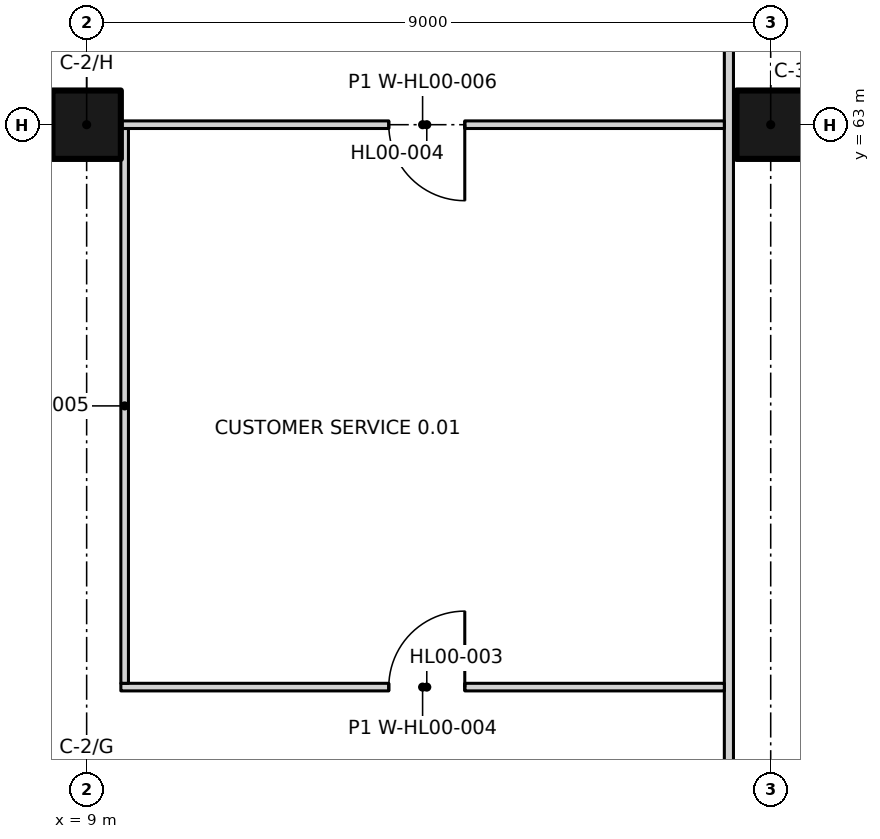
"""IFC4 building model, lengths in metres.
Left out: names, types, materials, properties, quantities, classifications, styles, units other than length and angle.
Written with IfcOpenShell. Run it as: python <this file> out.ifc"""

import sys

from ifc_helpers import new_model, si_unit, direction, frame, frame_2d, origin, origin_2d, place, context, subcontext, project, spatial, rectangle, extrude, element, fill, save


model = new_model("IFC4")
c1 = context("Model", 3, precision=1e-05, world=origin(), true_north=direction((0.0, 1.0)))
c2 = subcontext(c1, "Body", "Model", "MODEL_VIEW")
j1 = project(units=[si_unit("LENGTHUNIT", "METRE"), si_unit("PLANEANGLEUNIT", "RADIAN")], contexts=[c1])
p1 = place(None, origin())
s1 = spatial("IfcSite", under=j1, at=p1, CompositionType="ELEMENT")
p2 = place(p1, origin())
s2 = spatial("IfcBuilding", under=s1, at=p2, CompositionType="ELEMENT")
p3 = place(p2, origin())
s3 = spatial("IfcBuildingStorey", under=s2, at=p3, CompositionType="ELEMENT", Elevation=0.0)
for number, where, z_axis, x_axis in (
    (1, (9.0, 63.0, 0.0), (0.0, 0.0, 1.0), (1.0, 0.0, 0.0)),
    (2, (18.0, 63.0, 0.0), (0.0, 0.0, 1.0), (1.0, 0.0, 0.0)),
):
    element("IfcColumn", number, at=place(p3, frame(where, z_axis=z_axis, x_axis=x_axis)), inside=s3, PredefinedType="COLUMN", context=c2, shape_type="SweptSolid", body=[
        extrude(rectangle(XDim=0.9, YDim=0.9, at=origin_2d()), origin(), (0.0, 0.0, 1.0), 6.0),
    ])
p4 = place(p3, frame((17.45, 53.51, 0.0), z_axis=(0.0, 0.0, 1.0), x_axis=(0.0, 1.0, 0.0)))
e3 = element("IfcWall", 3, at=p4, inside=s3, PredefinedType="PARTITIONING", context=c2, shape_type="SweptSolid", body=[
    extrude(rectangle(XDim=36.415, YDim=0.12, at=frame_2d((18.208, 0.0))), origin(), (0.0, 0.0, 1.0), 5.2),
])
p5 = place(p4, frame((14.89, 0.0, 0.0), z_axis=(0.0, 0.0, 1.0), x_axis=(-1.0, 0.0, 0.0)))
e4 = element("IfcOpeningElement", 4, at=p5, cuts=e3, PredefinedType="OPENING", context=c2, shape_type="SweptSolid", body=[
    extrude(rectangle(XDim=1.8, YDim=2.1, at=frame_2d((0.9, 1.05))), frame((0.0, 0.07, 0.0), z_axis=(0.0, -1.0, 0.0), x_axis=(1.0, 0.0, 0.0)), (0.0, 0.0, 1.0), 0.14),
])
p6 = place(p3, frame((9.45, 55.6, 0.0), z_axis=(0.0, 0.0, 1.0), x_axis=(1.0, 0.0, 0.0)))
e5 = element("IfcWall", 5, at=p6, inside=s3, PredefinedType="PARTITIONING", context=c2, shape_type="SweptSolid", body=[
    extrude(rectangle(XDim=7.94, YDim=0.1, at=frame_2d((3.97, 0.0))), origin(), (0.0, 0.0, 1.0), 5.7),
])
p7 = place(p6, frame((3.525, 0.0, 0.0)))
e6 = element("IfcOpeningElement", 6, at=p7, cuts=e5, PredefinedType="OPENING", context=c2, shape_type="SweptSolid", body=[
    extrude(rectangle(XDim=1.0, YDim=2.1, at=frame_2d((0.5, 1.05))), frame((0.0, 0.06, 0.0), z_axis=(0.0, -1.0, 0.0), x_axis=(1.0, 0.0, 0.0)), (0.0, 0.0, 1.0), 0.12),
])
p8 = place(p3, frame((9.5, 55.65, 0.0), z_axis=(0.0, 0.0, 1.0), x_axis=(0.0, 1.0, 0.0)))
e7 = element("IfcWall", 7, at=p8, inside=s3, PredefinedType="PARTITIONING", context=c2, shape_type="SweptSolid", body=[
    extrude(rectangle(XDim=7.3, YDim=0.1, at=frame_2d((3.65, 0.0))), origin(), (0.0, 0.0, 1.0), 5.7),
])
p9 = place(p3, frame((9.45, 63.0, 0.0), z_axis=(0.0, 0.0, 1.0), x_axis=(1.0, 0.0, 0.0)))
e8 = element("IfcWall", 8, at=p9, inside=s3, PredefinedType="PARTITIONING", context=c2, shape_type="SweptSolid", body=[
    extrude(rectangle(XDim=7.94, YDim=0.1, at=frame_2d((3.97, 0.0))), origin(), (0.0, 0.0, 1.0), 5.7),
])
p10 = place(p9, frame((4.525, 0.0, 0.0), z_axis=(0.0, 0.0, 1.0), x_axis=(-1.0, 0.0, 0.0)))
e9 = element("IfcOpeningElement", 9, at=p10, cuts=e8, PredefinedType="OPENING", context=c2, shape_type="SweptSolid", body=[
    extrude(rectangle(XDim=1.0, YDim=2.1, at=frame_2d((0.5, 1.05))), frame((0.0, 0.06, 0.0), z_axis=(0.0, -1.0, 0.0), x_axis=(1.0, 0.0, 0.0)), (0.0, 0.0, 1.0), 0.12),
])
p11 = place(p7, origin())
e10 = element("IfcDoor", 10, at=p11, inside=s3, OperationType="SINGLE_SWING_RIGHT", PredefinedType="DOOR", context=c2, shape_type="SweptSolid", body=[
    extrude(rectangle(XDim=1.0, YDim=2.1, at=frame_2d((0.5, 1.05))), frame((0.0, 0.025, 0.0), z_axis=(0.0, -1.0, 0.0), x_axis=(1.0, 0.0, 0.0)), (0.0, 0.0, 1.0), 0.05),
])
fill(e6, e10)
p12 = place(p10, origin())
e11 = element("IfcDoor", 11, at=p12, inside=s3, OperationType="SINGLE_SWING_LEFT", PredefinedType="DOOR", context=c2, shape_type="SweptSolid", body=[
    extrude(rectangle(XDim=1.0, YDim=2.1, at=frame_2d((0.5, 1.05))), frame((0.0, 0.025, 0.0), z_axis=(0.0, -1.0, 0.0), x_axis=(1.0, 0.0, 0.0)), (0.0, 0.0, 1.0), 0.05),
])
fill(e9, e11)
save(model, sys.argv[1])
